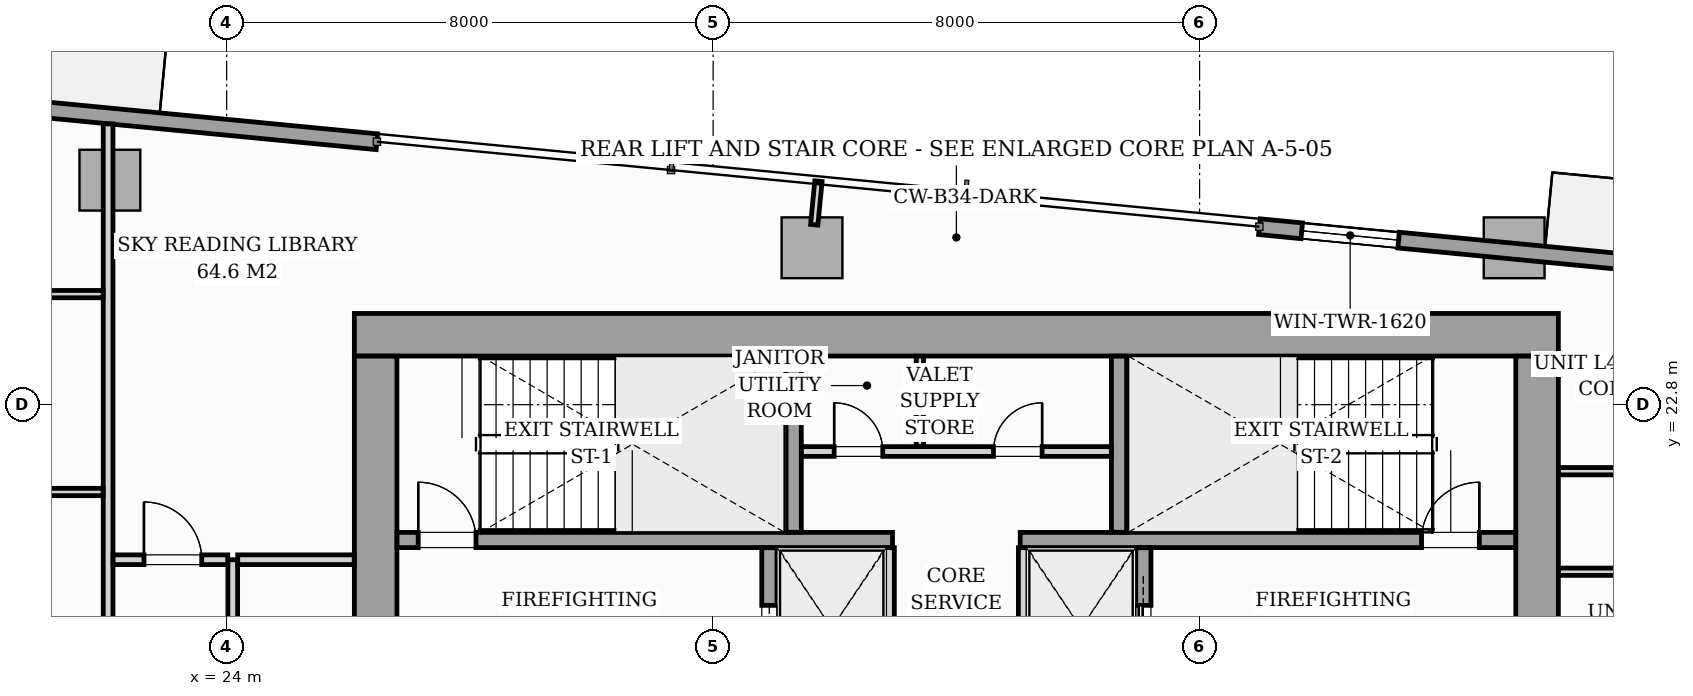
"""IFC4 building model, lengths in metres.
Left out: names, types, materials, properties, quantities, classifications, styles, units other than length and angle.
Written with IfcOpenShell. Run it as: python <this file> out.ifc"""

import sys

from ifc_helpers import new_model, si_unit, direction, frame, frame_2d, origin, origin_2d, place, context, subcontext, project, spatial, rectangle, i_section, extrude, source, transform, mapped, element, fill, save


model = new_model("IFC4")
c1 = context("Model", 3, precision=1e-05, world=origin(), true_north=direction((0.0, 1.0)))
c2 = subcontext(c1, "Body", "Model", "MODEL_VIEW")
j1 = project(units=[si_unit("LENGTHUNIT", "METRE"), si_unit("PLANEANGLEUNIT", "RADIAN")], contexts=[c1])
p1 = place(None, origin())
s1 = spatial("IfcSite", under=j1, at=p1, CompositionType="ELEMENT")
p2 = place(p1, origin())
s2 = spatial("IfcBuilding", under=s1, at=p2, CompositionType="ELEMENT")
p3 = place(p2, frame((0.0, 0.0, 153.4)))
s3 = spatial("IfcBuildingStorey", under=s2, at=p3, CompositionType="ELEMENT", Elevation=153.4)
m1 = source(origin(), c2, "Body", "SweptSolid", [
    extrude(i_section(OverallWidth=0.421, OverallDepth=0.465, WebThickness=0.045, FlangeThickness=0.073, FilletRadius=0.018, at=origin_2d()), origin(), (0.0, 0.0, 1.0), 3.196),
])
for number, where, z_axis, x_axis in (
    (1, (26.4, 24.0, 0.002), (0.0, 0.0, 1.0), (1.0, 0.0, 0.0)),
    (2, (33.12, 24.0, 0.002), (0.0, 0.0, 1.0), (1.0, 0.0, 0.0)),
    (3, (38.88, 24.0, 0.002), (0.0, 0.0, 1.0), (1.0, 0.0, 0.0)),
    (4, (45.6, 24.0, 0.002), (0.0, 0.0, 1.0), (1.0, 0.0, 0.0)),
):
    element("IfcColumn", number, at=place(p3, frame(where, z_axis=z_axis, x_axis=x_axis)), inside=s3, PredefinedType="PILASTER", context=c2, shape_type="MappedRepresentation", body=[
        mapped(m1, transform((0.0, 0.0, 0.0), scale=1.0)),
    ])
m2 = source(origin(), c2, "Body", "SweptSolid", [
    extrude(rectangle(XDim=1.0, YDim=1.0, at=origin_2d()), origin(), (0.0, 0.0, 1.0), 3.196),
])
for number, where, z_axis, x_axis in (
    (5, (22.08, 26.492, 0.002), (0.0, 0.0, 1.0), (0.995, -0.096, 0.0)),
    (6, (33.626, 25.38, 0.002), (0.0, 0.0, 1.0), (0.995, -0.096, 0.0)),
    (7, (45.173, 25.38, 0.002), (0.0, 0.0, 1.0), (0.995, -0.096, 0.0)),
):
    element("IfcColumn", number, at=place(p3, frame(where, z_axis=z_axis, x_axis=x_axis)), inside=s3, PredefinedType="COLUMN", context=c2, shape_type="MappedRepresentation", body=[
        mapped(m2, transform((0.0, 0.0, 0.0), scale=1.0)),
    ])
p4 = place(p3, frame((9.539, 28.754, 0.0), z_axis=(0.0, 0.0, 1.0), x_axis=(0.995397345886, -0.09583383433, 0.0)))
e8 = element("IfcWall", 8, at=p4, inside=s3, PredefinedType="STANDARD", context=c2, shape_type="SweptSolid", body=[
    extrude(rectangle(XDim=17.01, YDim=0.26, at=frame_2d((8.505, 0.0))), origin(), (0.0, 0.0, 1.0), 2.94),
])
p5 = place(p4, frame((6.974, 0.0, 0.0)))
e9 = element("IfcOpeningElement", 9, at=p5, cuts=e8, PredefinedType="OPENING", context=c2, shape_type="SweptSolid", body=[
    extrude(rectangle(XDim=1.8, YDim=2.06, at=frame_2d((0.9, 1.03))), frame((0.0, 0.14, 0.0), z_axis=(0.0, -1.0, 0.0), x_axis=(1.0, 0.0, 0.0)), (0.0, 0.0, 1.0), 0.28),
])
p6 = place(p4, frame((2.05, 0.0, 0.65)))
e10 = element("IfcOpeningElement", 10, at=p6, cuts=e8, PredefinedType="OPENING", context=c2, shape_type="SweptSolid", body=[
    extrude(rectangle(XDim=1.6, YDim=1.5, at=frame_2d((0.8, 0.75))), frame((0.0, 0.14, 0.0), z_axis=(0.0, -1.0, 0.0), x_axis=(1.0, 0.0, 0.0)), (0.0, 0.0, 1.0), 0.28),
])
p7 = place(p3, frame((40.983, 25.727, 0.0), z_axis=(0.0, 0.0, 1.0), x_axis=(0.995395844771, -0.095849424686, 0.0)))
e11 = element("IfcWall", 11, at=p7, inside=s3, PredefinedType="STANDARD", context=c2, shape_type="SweptSolid", body=[
    extrude(rectangle(XDim=17.01, YDim=0.26, at=frame_2d((8.505, 0.0))), origin(), (0.0, 0.0, 1.0), 2.94),
])
p8 = place(p7, frame((9.25, 0.0, 0.0)))
e12 = element("IfcOpeningElement", 12, at=p8, cuts=e11, PredefinedType="OPENING", context=c2, shape_type="SweptSolid", body=[
    extrude(rectangle(XDim=1.8, YDim=2.06, at=frame_2d((0.9, 1.03))), frame((0.0, 0.14, 0.0), z_axis=(0.0, -1.0, 0.0), x_axis=(1.0, 0.0, 0.0)), (0.0, 0.0, 1.0), 0.28),
])
p9 = place(p7, frame((0.7, 0.0, 0.65)))
e13 = element("IfcOpeningElement", 13, at=p9, cuts=e11, PredefinedType="OPENING", context=c2, shape_type="SweptSolid", body=[
    extrude(rectangle(XDim=1.6, YDim=1.5, at=frame_2d((0.8, 0.75))), frame((0.0, 0.14, 0.0), z_axis=(0.0, -1.0, 0.0), x_axis=(1.0, 0.0, 0.0)), (0.0, 0.0, 1.0), 0.28),
])
p10 = place(p3, frame((26.1, 23.95, 0.0), z_axis=(0.0, 0.0, 1.0), x_axis=(1.0, 0.0, 0.0)))
e14 = element("IfcWall", 14, at=p10, inside=s3, PredefinedType="SHEAR", context=c2, shape_type="SweptSolid", body=[
    extrude(rectangle(XDim=19.8, YDim=0.7, at=frame_2d((9.9, 0.0))), origin(), (0.0, 0.0, 1.0), 3.2),
])
for number, where, z_axis, x_axis in (
    (15, (26.45, 17.802, 0.0), (0.0, 0.0, 1.0), (0.0, 1.0, 0.0)),
    (16, (45.55, 17.802, 0.0), (0.0, 0.0, 1.0), (0.0, 1.0, 0.0)),
):
    element("IfcWall", number, at=place(p3, frame(where, z_axis=z_axis, x_axis=x_axis)), inside=s3, PredefinedType="SHEAR", context=c2, shape_type="SweptSolid", body=[
        extrude(rectangle(XDim=5.796, YDim=0.7, at=frame_2d((2.898, 0.0))), origin(), (0.0, 0.0, 1.0), 3.2),
    ])
p11 = place(p3, frame((26.802, 20.575, 0.0), z_axis=(0.0, 0.0, 1.0), x_axis=(1.0, 0.0, 0.0)))
e17 = element("IfcWall", 17, at=p11, inside=s3, PredefinedType="SOLIDWALL", context=c2, shape_type="SweptSolid", body=[
    extrude(rectangle(XDim=8.148, YDim=0.25, at=frame_2d((4.074, 0.0))), origin(), (0.0, 0.0, 1.0), 3.2),
])
p12 = place(p11, frame((0.348, 0.0, 0.0)))
e18 = element("IfcOpeningElement", 18, at=p12, cuts=e17, PredefinedType="OPENING", context=c2, shape_type="SweptSolid", body=[
    extrude(rectangle(XDim=0.95, YDim=2.06, at=frame_2d((0.475, 1.03))), frame((0.0, 0.135, 0.0), z_axis=(0.0, -1.0, 0.0), x_axis=(1.0, 0.0, 0.0)), (0.0, 0.0, 1.0), 0.27),
])
p13 = place(p3, frame((37.05, 20.575, 0.0), z_axis=(0.0, 0.0, 1.0), x_axis=(1.0, 0.0, 0.0)))
e19 = element("IfcWall", 19, at=p13, inside=s3, PredefinedType="SOLIDWALL", context=c2, shape_type="SweptSolid", body=[
    extrude(rectangle(XDim=8.148, YDim=0.25, at=frame_2d((4.074, 0.0))), origin(), (0.0, 0.0, 1.0), 3.2),
])
p14 = place(p13, frame((6.6, 0.0, 0.0)))
e20 = element("IfcOpeningElement", 20, at=p14, cuts=e19, PredefinedType="OPENING", context=c2, shape_type="SweptSolid", body=[
    extrude(rectangle(XDim=0.95, YDim=2.06, at=frame_2d((0.475, 1.03))), frame((0.0, 0.135, 0.0), z_axis=(0.0, -1.0, 0.0), x_axis=(1.0, 0.0, 0.0)), (0.0, 0.0, 1.0), 0.27),
])
for number, where, z_axis, x_axis in (
    (21, (33.325, 20.702, 0.0), (0.0, 0.0, 1.0), (0.0, 1.0, 0.0)),
    (22, (38.675, 20.702, 0.0), (0.0, 0.0, 1.0), (0.0, 1.0, 0.0)),
):
    element("IfcWall", number, at=place(p3, frame(where, z_axis=z_axis, x_axis=x_axis)), inside=s3, PredefinedType="SOLIDWALL", context=c2, shape_type="SweptSolid", body=[
        extrude(rectangle(XDim=2.896, YDim=0.25, at=frame_2d((1.448, 0.0))), origin(), (0.0, 0.0, 1.0), 3.2),
    ])
p15 = place(p3, frame((32.925, 17.802, 0.0), z_axis=(0.0, 0.0, 1.0), x_axis=(0.0, 1.0, 0.0)))
e23 = element("IfcWall", 23, at=p15, inside=s3, PredefinedType="SOLIDWALL", context=c2, shape_type="SweptSolid", body=[
    extrude(rectangle(XDim=2.646, YDim=0.25, at=frame_2d((1.323, 0.0))), origin(), (0.0, 0.0, 1.0), 3.2),
])
p16 = place(p15, frame((0.598, 0.0, 0.0)))
e24 = element("IfcOpeningElement", 24, at=p16, cuts=e23, PredefinedType="OPENING", context=c2, shape_type="SweptSolid", body=[
    extrude(rectangle(XDim=1.1, YDim=2.08, at=frame_2d((0.55, 1.04))), frame((0.0, 0.135, 0.0), z_axis=(0.0, -1.0, 0.0), x_axis=(1.0, 0.0, 0.0)), (0.0, 0.0, 1.0), 0.27),
])
for number, where, z_axis, x_axis in (
    (25, (34.9, 17.802, 0.0), (0.0, 0.0, 1.0), (0.0, 1.0, 0.0)),
    (26, (37.1, 17.802, 0.0), (0.0, 0.0, 1.0), (0.0, 1.0, 0.0)),
):
    element("IfcWall", number, at=place(p3, frame(where, z_axis=z_axis, x_axis=x_axis)), inside=s3, PredefinedType="PARTITIONING", context=c2, shape_type="SweptSolid", body=[
        extrude(rectangle(XDim=2.646, YDim=0.16, at=frame_2d((1.323, 0.0))), origin(), (0.0, 0.0, 1.0), 2.94),
    ])
p17 = place(p3, frame((39.075, 17.802, 0.0), z_axis=(0.0, 0.0, 1.0), x_axis=(0.0, 1.0, 0.0)))
e27 = element("IfcWall", 27, at=p17, inside=s3, PredefinedType="SOLIDWALL", context=c2, shape_type="SweptSolid", body=[
    extrude(rectangle(XDim=2.646, YDim=0.25, at=frame_2d((1.323, 0.0))), origin(), (0.0, 0.0, 1.0), 3.2),
])
p18 = place(p17, frame((0.598, 0.0, 0.0)))
e28 = element("IfcOpeningElement", 28, at=p18, cuts=e27, PredefinedType="OPENING", context=c2, shape_type="SweptSolid", body=[
    extrude(rectangle(XDim=1.1, YDim=2.08, at=frame_2d((0.55, 1.04))), frame((0.0, 0.135, 0.0), z_axis=(0.0, -1.0, 0.0), x_axis=(1.0, 0.0, 0.0)), (0.0, 0.0, 1.0), 0.27),
])
p19 = place(p3, frame((33.452, 22.03, 0.0), z_axis=(0.0, 0.0, 1.0), x_axis=(1.0, 0.0, 0.0)))
e29 = element("IfcWall", 29, at=p19, inside=s3, PredefinedType="PARTITIONING", context=c2, shape_type="SweptSolid", body=[
    extrude(rectangle(XDim=5.096, YDim=0.16, at=frame_2d((2.548, 0.0))), origin(), (0.0, 0.0, 1.0), 2.94),
])
p20 = place(p19, frame((0.538, 0.0, 0.0)))
e30 = element("IfcOpeningElement", 30, at=p20, cuts=e29, PredefinedType="OPENING", context=c2, shape_type="SweptSolid", body=[
    extrude(rectangle(XDim=0.8, YDim=2.05, at=frame_2d((0.4, 1.025))), frame((0.0, 0.09, 0.0), z_axis=(0.0, -1.0, 0.0), x_axis=(1.0, 0.0, 0.0)), (0.0, 0.0, 1.0), 0.18),
])
p21 = place(p19, frame((3.158, 0.0, 0.0)))
e31 = element("IfcOpeningElement", 31, at=p21, cuts=e29, PredefinedType="OPENING", context=c2, shape_type="SweptSolid", body=[
    extrude(rectangle(XDim=0.8, YDim=2.05, at=frame_2d((0.4, 1.025))), frame((0.0, 0.09, 0.0), z_axis=(0.0, -1.0, 0.0), x_axis=(1.0, 0.0, 0.0)), (0.0, 0.0, 1.0), 0.18),
])
p22 = place(p3, frame((35.4, 22.112, 0.0), z_axis=(0.0, 0.0, 1.0), x_axis=(0.0, 1.0, 0.0)))
e32 = element("IfcWall", 32, at=p22, inside=s3, PredefinedType="PARTITIONING", context=c2, shape_type="SweptSolid", body=[
    extrude(rectangle(XDim=1.486, YDim=0.12, at=frame_2d((0.743, 0.0))), origin(), (0.0, 0.0, 1.0), 2.94),
])
p23 = place(p3, frame((22.05, 12.632, 0.0), z_axis=(0.0, 0.0, 1.0), x_axis=(0.0, 1.0, 0.0)))
e33 = element("IfcWall", 33, at=p23, inside=s3, PredefinedType="PARTITIONING", context=c2, shape_type="SweptSolid", body=[
    extrude(rectangle(XDim=14.785, YDim=0.16, at=frame_2d((7.393, 0.0))), origin(), (0.0, 0.0, 1.0), 2.94),
])
p24 = place(p23, frame((0.493, 0.0, 0.0)))
e34 = element("IfcOpeningElement", 34, at=p24, cuts=e33, PredefinedType="OPENING", context=c2, shape_type="SweptSolid", body=[
    extrude(rectangle(XDim=0.95, YDim=2.06, at=frame_2d((0.475, 1.03))), frame((0.0, 0.09, 0.0), z_axis=(0.0, -1.0, 0.0), x_axis=(1.0, 0.0, 0.0)), (0.0, 0.0, 1.0), 0.18),
])
p25 = place(p3, frame((6.709, 24.618, 0.0), z_axis=(0.0, 0.0, 1.0), x_axis=(1.0, 0.0, 0.0)))
e35 = element("IfcWall", 35, at=p25, inside=s3, PredefinedType="PARTITIONING", context=c2, shape_type="SweptSolid", body=[
    extrude(rectangle(XDim=15.259, YDim=0.12, at=frame_2d((7.629, 0.0))), origin(), (0.0, 0.0, 1.0), 2.94),
])
p26 = place(p25, frame((9.137, 0.0, 0.0)))
e36 = element("IfcOpeningElement", 36, at=p26, cuts=e35, PredefinedType="OPENING", context=c2, shape_type="SweptSolid", body=[
    extrude(rectangle(XDim=0.85, YDim=2.05, at=frame_2d((0.425, 1.025))), frame((0.0, 0.07, 0.0), z_axis=(0.0, -1.0, 0.0), x_axis=(1.0, 0.0, 0.0)), (0.0, 0.0, 1.0), 0.14),
])
p27 = place(p3, frame((6.396, 21.364, 0.0), z_axis=(0.0, 0.0, 1.0), x_axis=(1.0, 0.0, 0.0)))
e37 = element("IfcWall", 37, at=p27, inside=s3, PredefinedType="PARTITIONING", context=c2, shape_type="SweptSolid", body=[
    extrude(rectangle(XDim=15.572, YDim=0.12, at=frame_2d((7.786, 0.0))), origin(), (0.0, 0.0, 1.0), 2.94),
])
p28 = place(p27, frame((9.45, 0.0, 0.0)))
e38 = element("IfcOpeningElement", 38, at=p28, cuts=e37, PredefinedType="OPENING", context=c2, shape_type="SweptSolid", body=[
    extrude(rectangle(XDim=0.85, YDim=2.05, at=frame_2d((0.425, 1.025))), frame((0.0, 0.07, 0.0), z_axis=(0.0, -1.0, 0.0), x_axis=(1.0, 0.0, 0.0)), (0.0, 0.0, 1.0), 0.14),
])
p29 = place(p3, frame((45.902, 21.706, 0.0), z_axis=(0.0, 0.0, 1.0), x_axis=(1.0, 0.0, 0.0)))
e39 = element("IfcWall", 39, at=p29, inside=s3, PredefinedType="PARTITIONING", context=c2, shape_type="SweptSolid", body=[
    extrude(rectangle(XDim=12.775, YDim=0.12, at=frame_2d((6.388, 0.0))), origin(), (0.0, 0.0, 1.0), 2.94),
])
p30 = place(p29, frame((4.501, 0.0, 0.0)))
e40 = element("IfcOpeningElement", 40, at=p30, cuts=e39, PredefinedType="OPENING", context=c2, shape_type="SweptSolid", body=[
    extrude(rectangle(XDim=0.85, YDim=2.05, at=frame_2d((0.425, 1.025))), frame((0.0, 0.07, 0.0), z_axis=(0.0, -1.0, 0.0), x_axis=(1.0, 0.0, 0.0)), (0.0, 0.0, 1.0), 0.14),
])
p31 = place(p3, frame((45.902, 20.053, 0.0), z_axis=(0.0, 0.0, 1.0), x_axis=(1.0, 0.0, 0.0)))
e41 = element("IfcWall", 41, at=p31, inside=s3, PredefinedType="PARTITIONING", context=c2, shape_type="SweptSolid", body=[
    extrude(rectangle(XDim=14.055, YDim=0.12, at=frame_2d((7.027, 0.0))), origin(), (0.0, 0.0, 1.0), 2.94),
])
p32 = place(p31, frame((4.501, 0.0, 0.0)))
e42 = element("IfcOpeningElement", 42, at=p32, cuts=e41, PredefinedType="OPENING", context=c2, shape_type="SweptSolid", body=[
    extrude(rectangle(XDim=0.85, YDim=2.05, at=frame_2d((0.425, 1.025))), frame((0.0, 0.07, 0.0), z_axis=(0.0, -1.0, 0.0), x_axis=(1.0, 0.0, 0.0)), (0.0, 0.0, 1.0), 0.14),
])
p33 = place(p3, frame((24.1, 14.66, 0.0), z_axis=(0.0, 0.0, 1.0), x_axis=(0.0, 1.0, 0.0)))
e43 = element("IfcWall", 43, at=p33, inside=s3, PredefinedType="PARTITIONING", context=c2, shape_type="SweptSolid", body=[
    extrude(rectangle(XDim=5.59, YDim=0.16, at=frame_2d((2.795, 0.0))), origin(), (0.0, 0.0, 1.0), 2.94),
])
p34 = place(p33, frame((2.36, 0.0, 0.0)))
e44 = element("IfcOpeningElement", 44, at=p34, cuts=e43, PredefinedType="OPENING", context=c2, shape_type="SweptSolid", body=[
    extrude(rectangle(XDim=0.85, YDim=2.0, at=frame_2d((0.425, 1.0))), frame((0.0, 0.09, 0.0), z_axis=(0.0, -1.0, 0.0), x_axis=(1.0, 0.0, 0.0)), (0.0, 0.0, 1.0), 0.18),
])
p35 = place(p3, frame((22.132, 20.25, 0.0), z_axis=(0.0, 0.0, 1.0), x_axis=(1.0, 0.0, 0.0)))
e45 = element("IfcWall", 45, at=p35, inside=s3, PredefinedType="PARTITIONING", context=c2, shape_type="SweptSolid", body=[
    extrude(rectangle(XDim=1.886, YDim=0.16, at=frame_2d((0.943, 0.0))), origin(), (0.0, 0.0, 1.0), 2.94),
])
p36 = place(p35, frame((0.508, 0.0, 0.0)))
e46 = element("IfcOpeningElement", 46, at=p36, cuts=e45, PredefinedType="OPENING", context=c2, shape_type="SweptSolid", body=[
    extrude(rectangle(XDim=0.95, YDim=2.06, at=frame_2d((0.475, 1.03))), frame((0.0, 0.09, 0.0), z_axis=(0.0, -1.0, 0.0), x_axis=(1.0, 0.0, 0.0)), (0.0, 0.0, 1.0), 0.18),
])
p37 = place(p3, frame((24.182, 20.25, 0.0), z_axis=(0.0, 0.0, 1.0), x_axis=(1.0, 0.0, 0.0)))
e47 = element("IfcWall", 47, at=p37, inside=s3, PredefinedType="PARTITIONING", context=c2, shape_type="SweptSolid", body=[
    extrude(rectangle(XDim=1.916, YDim=0.16, at=frame_2d((0.958, 0.0))), origin(), (0.0, 0.0, 1.0), 2.94),
])
p38 = place(p3, frame((33.663, 25.759, 0.0), z_axis=(0.0, 0.0, 1.0), x_axis=(0.095977354523, 0.995383517755, 0.0)))
e48 = element("IfcWall", 48, at=p38, inside=s3, PredefinedType="PARTITIONING", context=c2, shape_type="SweptSolid", body=[
    extrude(rectangle(XDim=0.72, YDim=0.12, at=frame_2d((0.36, 0.0))), origin(), (0.0, 0.0, 1.0), 2.94),
])
m3 = source(origin(), c2, "Body", "SweptSolid", [
    extrude(rectangle(XDim=1.6, YDim=1.5, at=frame_2d((0.8, 0.75))), frame((0.0, 0.03, 0.0), z_axis=(0.0, -1.0, 0.0), x_axis=(1.0, 0.0, 0.0)), (0.0, 0.0, 1.0), 0.06),
])
p39 = place(p9, origin())
e49 = element("IfcWindow", 49, at=p39, inside=s3, PartitioningType="SINGLE_PANEL", PredefinedType="WINDOW", context=c2, shape_type="MappedRepresentation", body=[
    mapped(m3, transform((0.0, 0.0, 0.0), scale=1.0)),
])
fill(e13, e49)
m4 = source(origin(), c2, "Body", "SweptSolid", [
    extrude(rectangle(XDim=0.95, YDim=2.06, at=frame_2d((0.475, 1.03))), frame((0.0, 0.025, 0.0), z_axis=(0.0, -1.0, 0.0), x_axis=(1.0, 0.0, 0.0)), (0.0, 0.0, 1.0), 0.05),
])
p40 = place(p12, origin())
e50 = element("IfcDoor", 50, at=p40, inside=s3, OperationType="SINGLE_SWING_LEFT", PredefinedType="DOOR", context=c2, shape_type="MappedRepresentation", body=[
    mapped(m4, transform((0.0, 0.0, 0.0), scale=1.0)),
])
fill(e18, e50)
p41 = place(p14, origin())
e51 = element("IfcDoor", 51, at=p41, inside=s3, OperationType="SINGLE_SWING_RIGHT", PredefinedType="DOOR", context=c2, shape_type="MappedRepresentation", body=[
    mapped(m4, transform((0.0, 0.0, 0.0), scale=1.0)),
])
fill(e20, e51)
m5 = source(origin(), c2, "Body", "SweptSolid", [
    extrude(rectangle(XDim=1.1, YDim=2.08, at=frame_2d((0.55, 1.04))), frame((0.0, 0.025, 0.0), z_axis=(0.0, -1.0, 0.0), x_axis=(1.0, 0.0, 0.0)), (0.0, 0.0, 1.0), 0.05),
])
p42 = place(p16, origin())
e52 = element("IfcDoor", 52, at=p42, inside=s3, OperationType="SLIDING_TO_LEFT", PredefinedType="DOOR", context=c2, shape_type="MappedRepresentation", body=[
    mapped(m5, transform((0.0, 0.0, 0.0), scale=1.0)),
])
fill(e24, e52)
p43 = place(p18, origin())
e53 = element("IfcDoor", 53, at=p43, inside=s3, OperationType="SLIDING_TO_RIGHT", PredefinedType="DOOR", context=c2, shape_type="MappedRepresentation", body=[
    mapped(m5, transform((0.0, 0.0, 0.0), scale=1.0)),
])
fill(e28, e53)
m6 = source(origin(), c2, "Body", "SweptSolid", [
    extrude(rectangle(XDim=0.8, YDim=2.05, at=frame_2d((0.4, 1.025))), frame((0.0, 0.025, 0.0), z_axis=(0.0, -1.0, 0.0), x_axis=(1.0, 0.0, 0.0)), (0.0, 0.0, 1.0), 0.05),
])
p44 = place(p20, origin())
e54 = element("IfcDoor", 54, at=p44, inside=s3, OperationType="SINGLE_SWING_LEFT", PredefinedType="DOOR", context=c2, shape_type="MappedRepresentation", body=[
    mapped(m6, transform((0.0, 0.0, 0.0), scale=1.0)),
])
fill(e30, e54)
p45 = place(p21, origin())
e55 = element("IfcDoor", 55, at=p45, inside=s3, OperationType="SINGLE_SWING_RIGHT", PredefinedType="DOOR", context=c2, shape_type="MappedRepresentation", body=[
    mapped(m6, transform((0.0, 0.0, 0.0), scale=1.0)),
])
fill(e31, e55)
m7 = source(origin(), c2, "Body", "SweptSolid", [
    extrude(rectangle(XDim=0.95, YDim=2.06, at=frame_2d((0.475, 1.03))), frame((0.0, 0.025, 0.0), z_axis=(0.0, -1.0, 0.0), x_axis=(1.0, 0.0, 0.0)), (0.0, 0.0, 1.0), 0.05),
])
p46 = place(p36, origin())
e56 = element("IfcDoor", 56, at=p46, inside=s3, OperationType="SINGLE_SWING_LEFT", PredefinedType="DOOR", context=c2, shape_type="MappedRepresentation", body=[
    mapped(m7, transform((0.0, 0.0, 0.0), scale=1.0)),
])
fill(e46, e56)
save(model, sys.argv[1])
